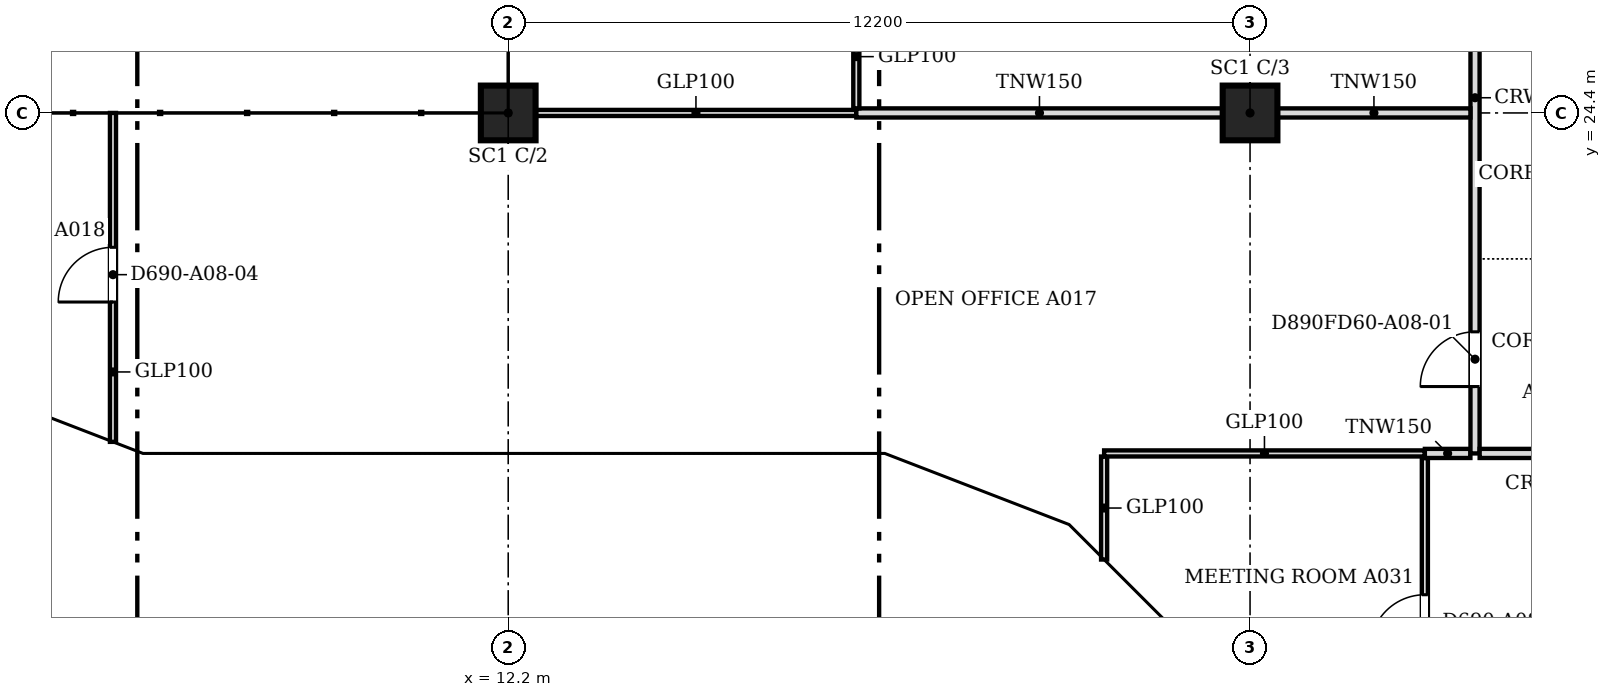
"""IFC4 building model, lengths in metres.
Left out: names, types, materials, properties, quantities, classifications, styles, units other than length and angle.
Written with IfcOpenShell. Run it as: python <this file> out.ifc"""

import sys

from ifc_helpers import new_model, si_unit, direction, frame, frame_2d, origin, origin_2d, place, context, subcontext, project, spatial, polyline, rectangle, outline, extrude, faceted_brep, source, transform, mapped, element, fill, save


model = new_model("IFC4")
c1 = context("Model", 3, precision=1e-05, world=origin(), true_north=direction((0.0, 1.0)))
c2 = subcontext(c1, "Body", "Model", "MODEL_VIEW")
j1 = project(units=[si_unit("LENGTHUNIT", "METRE"), si_unit("PLANEANGLEUNIT", "RADIAN")], contexts=[c1])
p1 = place(None, origin())
s1 = spatial("IfcSite", under=j1, at=p1, CompositionType="ELEMENT")
p2 = place(p1, origin())
s2 = spatial("IfcBuilding", under=s1, at=p2, CompositionType="ELEMENT")
p3 = place(p2, frame((0.0, 0.0, 95.2)))
s3 = spatial("IfcBuildingStorey", under=s2, at=p3, CompositionType="ELEMENT", Elevation=95.2)
for number, where, z_axis, x_axis in (
    (1, (12.2, 24.4, 0.0), (0.0, 0.0, 1.0), (1.0, 0.0, 0.0)),
    (2, (24.4, 24.4, 0.0), (0.0, 0.0, 1.0), (1.0, 0.0, 0.0)),
):
    element("IfcColumn", number, at=place(p3, frame(where, z_axis=z_axis, x_axis=x_axis)), inside=s3, PredefinedType="COLUMN", context=c2, shape_type="SweptSolid", body=[
        extrude(rectangle(XDim=0.9, YDim=0.9, at=origin_2d()), origin(), (0.0, 0.0, 1.0), 3.6),
    ])
m1 = source(origin(), c2, "Body", "Brep", [
    faceted_brep([(0.053, -0.25, 0.0), (3.003, -0.25, 3.8), (0.053, -0.25, 7.6), (0.0, -0.25, 7.532), (0.0, -0.25, 0.068), (0.106, 0.25, 7.532), (2.957, 0.25, 3.86), (2.957, 0.25, 3.74), (0.106, 0.25, 0.068), (3.003, 0.0, 3.8), (0.053, 0.0, 0.0), (0.053, 0.0, 7.6)], [[[0, 1, 2, 3, 4]], [[5, 6, 7, 8]], [[8, 7, 9, 1, 0, 10]], [[6, 5, 11, 2, 1, 9]], [[3, 2, 11]], [[10, 0, 4]], [[8, 10, 4, 3, 11, 5]], [[9, 7, 6]]]),
])
p4 = place(p3, frame((3.344, 19.631, -3.8), z_axis=(0.0, 0.0, 1.0), x_axis=(0.933007896601, -0.359855894603, 0.0)))
e3 = element("IfcWall", 3, at=p4, inside=s3, PredefinedType="SOLIDWALL", context=c2, shape_type="MappedRepresentation", body=[
    mapped(m1, transform((0.0, 0.0, 0.0), scale=1.0)),
])
m2 = source(origin(), c2, "Body", "SweptSolid", [
    extrude(outline(polyline([(0.253, 0.665), (2.687, 3.8), (0.253, 6.935), (0.253, 0.665)])), frame((0.0, 0.26, 0.0), z_axis=(0.0, -1.0, 0.0), x_axis=(1.0, 0.0, 0.0)), (0.0, 0.0, 1.0), 0.52),
])
p5 = place(p4, origin())
e4 = element("IfcOpeningElement", 4, at=p5, cuts=e3, PredefinedType="OPENING", context=c2, shape_type="MappedRepresentation", body=[
    mapped(m2, transform((0.0, 0.0, 0.0), scale=1.0)),
])
m3 = source(origin(), c2, "Body", "Brep", [
    faceted_brep([(3.003, -0.25, 0.0), (6.053, -0.25, 3.8), (3.003, -0.25, 7.6), (0.0, -0.25, 3.8), (0.047, 0.25, 3.859), (3.003, 0.25, 7.6), (6.053, 0.25, 3.8), (3.003, 0.25, 0.0), (0.047, 0.25, 3.741), (0.0, 0.0, 3.8)], [[[0, 1, 2, 3]], [[4, 5, 6, 7, 8]], [[7, 6, 1, 0]], [[6, 5, 2, 1]], [[5, 4, 9, 3, 2]], [[8, 7, 0, 3, 9]], [[8, 9, 4]]]),
])
p6 = place(p3, frame((6.146, 18.55, -3.8), z_axis=(0.0, 0.0, 1.0), x_axis=(1.0, 0.0, 0.0)))
e5 = element("IfcWall", 5, at=p6, inside=s3, PredefinedType="SOLIDWALL", context=c2, shape_type="MappedRepresentation", body=[
    mapped(m3, transform((0.0, 0.0, 0.0), scale=1.0)),
])
m4 = source(origin(), c2, "Body", "SweptSolid", [
    extrude(outline(polyline([(3.005, 0.401), (5.733, 3.8), (3.005, 7.199), (0.319, 3.8), (3.005, 0.401)])), frame((0.0, 0.26, 0.0), z_axis=(0.0, -1.0, 0.0), x_axis=(1.0, 0.0, 0.0)), (0.0, 0.0, 1.0), 0.52),
])
p7 = place(p6, origin())
e6 = element("IfcOpeningElement", 6, at=p7, cuts=e5, PredefinedType="OPENING", context=c2, shape_type="MappedRepresentation", body=[
    mapped(m4, transform((0.0, 0.0, 0.0), scale=1.0)),
])
m5 = source(origin(), c2, "Body", "Brep", [
    faceted_brep([(3.05, -0.25, 0.0), (6.1, -0.25, 3.743), (6.1, -0.25, 3.857), (3.05, -0.25, 7.6), (0.0, -0.25, 3.8), (0.0, 0.25, 3.8), (3.05, 0.25, 7.6), (6.146, 0.25, 3.8), (3.05, 0.25, 0.0), (6.146, -0.0, 3.8)], [[[0, 1, 2, 3, 4]], [[5, 6, 7, 8]], [[8, 7, 9, 1, 0]], [[7, 6, 3, 2, 9]], [[6, 5, 4, 3]], [[5, 8, 0, 4]], [[1, 9, 2]]]),
])
p8 = place(p3, frame((12.2, 18.55, -3.8), z_axis=(0.0, 0.0, 1.0), x_axis=(1.0, 0.0, 0.0)))
e7 = element("IfcWall", 7, at=p8, inside=s3, PredefinedType="SOLIDWALL", context=c2, shape_type="MappedRepresentation", body=[
    mapped(m5, transform((0.0, 0.0, 0.0), scale=1.0)),
])
m6 = source(origin(), c2, "Body", "SweptSolid", [
    extrude(outline(polyline([(3.052, 0.398), (5.824, 3.8), (3.052, 7.203), (0.321, 3.8), (3.052, 0.398)])), frame((0.0, 0.26, 0.0), z_axis=(0.0, -1.0, 0.0), x_axis=(1.0, 0.0, 0.0)), (0.0, 0.0, 1.0), 0.52),
])
p9 = place(p8, origin())
e8 = element("IfcOpeningElement", 8, at=p9, cuts=e7, PredefinedType="OPENING", context=c2, shape_type="MappedRepresentation", body=[
    mapped(m6, transform((0.0, 0.0, 0.0), scale=1.0)),
])
m7 = source(origin(), c2, "Body", "Brep", [
    faceted_brep([(3.096, -0.25, 7.536), (0.047, -0.25, 3.856), (0.047, -0.25, 3.744), (3.096, -0.25, 0.064), (0.0, 0.25, 3.8), (3.149, 0.25, 7.6), (3.202, 0.25, 7.536), (3.202, 0.25, 0.064), (3.149, 0.25, 0.0), (3.149, -0.0, 0.0), (3.149, -0.0, 7.6), (0.0, 0.0, 3.8)], [[[0, 1, 2, 3]], [[4, 5, 6, 7, 8]], [[8, 7, 9]], [[6, 5, 10]], [[5, 4, 11, 1, 0, 10]], [[4, 8, 9, 3, 2, 11]], [[11, 2, 1]], [[3, 9, 7, 6, 10, 0]]]),
])
p10 = place(p3, frame((18.346, 18.55, -3.8), z_axis=(0.0, 0.0, 1.0), x_axis=(0.932985567668, -0.359913782069, 0.0)))
e9 = element("IfcWall", 9, at=p10, inside=s3, PredefinedType="SOLIDWALL", context=c2, shape_type="MappedRepresentation", body=[
    mapped(m7, transform((0.0, 0.0, 0.0), scale=1.0)),
])
m8 = source(origin(), c2, "Body", "SweptSolid", [
    extrude(outline(polyline([(2.949, 6.967), (0.325, 3.8), (2.949, 0.633), (2.949, 6.967)])), frame((0.0, 0.26, 0.0), z_axis=(0.0, -1.0, 0.0), x_axis=(1.0, 0.0, 0.0)), (0.0, 0.0, 1.0), 0.52),
])
p11 = place(p10, origin())
e10 = element("IfcOpeningElement", 10, at=p11, cuts=e9, PredefinedType="OPENING", context=c2, shape_type="MappedRepresentation", body=[
    mapped(m8, transform((0.0, 0.0, 0.0), scale=1.0)),
])
m9 = source(origin(), c2, "Body", "Brep", [
    faceted_brep([(0.106, -0.25, 0.064), (3.156, -0.25, 3.736), (3.156, -0.25, 3.864), (0.106, -0.25, 7.536), (0.0, 0.25, 7.536), (0.053, 0.25, 7.6), (3.209, 0.25, 3.8), (0.053, 0.25, 0.0), (0.0, 0.25, 0.064), (3.209, -0.0, 3.8), (0.053, 0.0, 0.0), (0.053, 0.0, 7.6)], [[[0, 1, 2, 3]], [[4, 5, 6, 7, 8]], [[7, 6, 9, 1, 0, 10]], [[6, 5, 11, 3, 2, 9]], [[5, 4, 11]], [[8, 7, 10]], [[8, 10, 0, 3, 11, 4]], [[1, 9, 2]]]),
])
p12 = place(p3, frame((21.248, 17.454, -3.8), z_axis=(0.0, 0.0, 1.0), x_axis=(0.707106781187, -0.707106781187, 0.0)))
e11 = element("IfcWall", 11, at=p12, inside=s3, PredefinedType="SOLIDWALL", context=c2, shape_type="MappedRepresentation", body=[
    mapped(m9, transform((0.0, 0.0, 0.0), scale=1.0)),
])
m10 = source(origin(), c2, "Body", "SweptSolid", [
    extrude(outline(polyline([(0.253, 0.632), (2.884, 3.8), (0.253, 6.968), (0.253, 0.632)])), frame((0.0, 0.26, 0.0), z_axis=(0.0, -1.0, 0.0), x_axis=(1.0, 0.0, 0.0)), (0.0, 0.0, 1.0), 0.52),
])
p13 = place(p12, origin())
e12 = element("IfcOpeningElement", 12, at=p13, cuts=e11, PredefinedType="OPENING", context=c2, shape_type="MappedRepresentation", body=[
    mapped(m10, transform((0.0, 0.0, 0.0), scale=1.0)),
])
p14 = place(p2, frame((0.0, 0.0, 99.0)))
s4 = spatial("IfcBuildingStorey", under=s2, at=p14, CompositionType="ELEMENT", Elevation=99.0)
m11 = source(origin(), c2, "Body", "Brep", [
    faceted_brep([(2.95, -0.25, 0.0), (2.997, -0.25, 0.059), (2.997, -0.25, 7.541), (2.95, -0.25, 7.6), (0.0, -0.25, 3.8), (0.053, 0.25, 3.868), (2.904, 0.25, 7.54), (2.904, 0.25, 0.06), (0.053, 0.25, 3.732), (2.95, 0.0, 0.0), (2.95, 0.0, 7.6), (0.0, 0.0, 3.8)], [[[0, 1, 2, 3, 4]], [[5, 6, 7, 8]], [[1, 0, 9]], [[10, 3, 2]], [[6, 5, 11, 4, 3, 10]], [[8, 7, 9, 0, 4, 11]], [[8, 11, 5]], [[1, 9, 7, 6, 10, 2]]]),
])
p15 = place(p14, frame((3.394, 19.612, -3.8), z_axis=(0.0, 0.0, 1.0), x_axis=(0.932990326376, -0.359901446078, 0.0)))
e13 = element("IfcWall", 13, at=p15, inside=s4, PredefinedType="SOLIDWALL", context=c2, shape_type="MappedRepresentation", body=[
    mapped(m11, transform((0.0, 0.0, 0.0), scale=1.0)),
])
m12 = source(origin(), c2, "Body", "SweptSolid", [
    extrude(outline(polyline([(2.75, 6.935), (0.316, 3.8), (2.75, 0.665), (2.75, 6.935)])), frame((0.0, 0.26, 0.0), z_axis=(0.0, -1.0, 0.0), x_axis=(1.0, 0.0, 0.0)), (0.0, 0.0, 1.0), 0.52),
])
p16 = place(p15, origin())
e14 = element("IfcOpeningElement", 14, at=p16, cuts=e13, PredefinedType="OPENING", context=c2, shape_type="MappedRepresentation", body=[
    mapped(m12, transform((0.0, 0.0, 0.0), scale=1.0)),
])
m13 = source(origin(), c2, "Body", "Brep", [
    faceted_brep([(0.047, -0.25, 0.0), (3.05, -0.25, 3.8), (0.047, -0.25, 7.6), (0.0, -0.25, 7.54), (0.0, -0.25, 0.06), (0.093, 0.25, 7.541), (3.05, 0.25, 3.8), (0.093, 0.25, 0.059), (0.047, 0.0, 0.0), (0.047, 0.0, 7.6)], [[[0, 1, 2, 3, 4]], [[5, 6, 7]], [[7, 6, 1, 0, 8]], [[6, 5, 9, 2, 1]], [[3, 2, 9]], [[8, 0, 4]], [[7, 8, 4, 3, 9, 5]]]),
])
p17 = place(p14, frame((6.1, 18.55, -3.8), z_axis=(0.0, 0.0, 1.0), x_axis=(1.0, 0.0, 0.0)))
e15 = element("IfcWall", 15, at=p17, inside=s4, PredefinedType="SOLIDWALL", context=c2, shape_type="MappedRepresentation", body=[
    mapped(m13, transform((0.0, 0.0, 0.0), scale=1.0)),
])
m14 = source(origin(), c2, "Body", "SweptSolid", [
    extrude(outline(polyline([(0.247, 0.656), (2.731, 3.8), (0.247, 6.944), (0.247, 0.656)])), frame((0.0, 0.26, 0.0), z_axis=(0.0, -1.0, 0.0), x_axis=(1.0, 0.0, 0.0)), (0.0, 0.0, 1.0), 0.52),
])
p18 = place(p17, origin())
e16 = element("IfcOpeningElement", 16, at=p18, cuts=e15, PredefinedType="OPENING", context=c2, shape_type="MappedRepresentation", body=[
    mapped(m14, transform((0.0, 0.0, 0.0), scale=1.0)),
])
m15 = source(origin(), c2, "Body", "SweptSolid", [
    extrude(outline(polyline([(3.05, 0.0), (6.1, 3.8), (3.05, 7.6), (0.0, 3.8), (3.05, 0.0)])), frame((0.0, 0.25, 0.0), z_axis=(0.0, -1.0, 0.0), x_axis=(1.0, 0.0, 0.0)), (0.0, 0.0, 1.0), 0.5),
])
p19 = place(p14, frame((9.15, 18.55, -3.8), z_axis=(0.0, 0.0, 1.0), x_axis=(1.0, 0.0, 0.0)))
e17 = element("IfcWall", 17, at=p19, inside=s4, PredefinedType="SOLIDWALL", context=c2, shape_type="MappedRepresentation", body=[
    mapped(m15, transform((0.0, 0.0, 0.0), scale=1.0)),
])
m16 = source(origin(), c2, "Body", "SweptSolid", [
    extrude(outline(polyline([(3.05, 0.399), (5.78, 3.8), (3.05, 7.201), (0.321, 3.8), (3.05, 0.399)])), frame((0.0, 0.26, 0.0), z_axis=(0.0, -1.0, 0.0), x_axis=(1.0, 0.0, 0.0)), (0.0, 0.0, 1.0), 0.52),
])
p20 = place(p19, origin())
e18 = element("IfcOpeningElement", 18, at=p20, cuts=e17, PredefinedType="OPENING", context=c2, shape_type="MappedRepresentation", body=[
    mapped(m16, transform((0.0, 0.0, 0.0), scale=1.0)),
])
m17 = source(origin(), c2, "Body", "Brep", [
    faceted_brep([(3.05, -0.25, 7.543), (0.0, -0.25, 3.8), (3.05, -0.25, 0.057), (0.0, 0.25, 3.8), (3.096, 0.25, 7.6), (3.143, 0.25, 7.544), (3.143, 0.25, 0.056), (3.096, 0.25, 0.0), (3.096, -0.0, 0.0), (3.096, -0.0, 7.6)], [[[0, 1, 2]], [[3, 4, 5, 6, 7]], [[7, 6, 8]], [[5, 4, 9]], [[4, 3, 1, 0, 9]], [[3, 7, 8, 2, 1]], [[2, 8, 6, 5, 9, 0]]]),
])
p21 = place(p14, frame((15.25, 18.55, -3.8), z_axis=(0.0, 0.0, 1.0), x_axis=(1.0, 0.0, 0.0)))
e19 = element("IfcWall", 19, at=p21, inside=s4, PredefinedType="SOLIDWALL", context=c2, shape_type="MappedRepresentation", body=[
    mapped(m17, transform((0.0, 0.0, 0.0), scale=1.0)),
])
m18 = source(origin(), c2, "Body", "SweptSolid", [
    extrude(outline(polyline([(2.896, 6.959), (0.323, 3.8), (2.896, 0.641), (2.896, 6.959)])), frame((0.0, 0.26, 0.0), z_axis=(0.0, -1.0, 0.0), x_axis=(1.0, 0.0, 0.0)), (0.0, 0.0, 1.0), 0.52),
])
p22 = place(p21, origin())
e20 = element("IfcOpeningElement", 20, at=p22, cuts=e19, PredefinedType="OPENING", context=c2, shape_type="MappedRepresentation", body=[
    mapped(m18, transform((0.0, 0.0, 0.0), scale=1.0)),
])
m19 = source(origin(), c2, "Body", "Brep", [
    faceted_brep([(0.093, -0.25, 0.056), (3.143, -0.25, 3.736), (3.143, -0.25, 3.864), (0.093, -0.25, 7.544), (0.0, 0.25, 7.543), (0.047, 0.25, 7.6), (3.196, 0.25, 3.8), (0.047, 0.25, 0.0), (0.0, 0.25, 0.057), (3.196, -0.0, 3.8), (0.047, 0.0, 0.0), (0.047, 0.0, 7.6)], [[[0, 1, 2, 3]], [[4, 5, 6, 7, 8]], [[7, 6, 9, 1, 0, 10]], [[6, 5, 11, 3, 2, 9]], [[5, 4, 11]], [[8, 7, 10]], [[8, 10, 0, 3, 11, 4]], [[1, 9, 2]]]),
])
p23 = place(p14, frame((18.303, 18.567, -3.8), z_axis=(0.0, 0.0, 1.0), x_axis=(0.932978940178, -0.359930961693, 0.0)))
e21 = element("IfcWall", 21, at=p23, inside=s4, PredefinedType="SOLIDWALL", context=c2, shape_type="MappedRepresentation", body=[
    mapped(m19, transform((0.0, 0.0, 0.0), scale=1.0)),
])
m20 = source(origin(), c2, "Body", "SweptSolid", [
    extrude(outline(polyline([(0.247, 0.633), (2.871, 3.8), (0.247, 6.967), (0.247, 0.633)])), frame((0.0, 0.26, 0.0), z_axis=(0.0, -1.0, 0.0), x_axis=(1.0, 0.0, 0.0)), (0.0, 0.0, 1.0), 0.52),
])
p24 = place(p23, origin())
e22 = element("IfcOpeningElement", 22, at=p24, cuts=e21, PredefinedType="OPENING", context=c2, shape_type="MappedRepresentation", body=[
    mapped(m20, transform((0.0, 0.0, 0.0), scale=1.0)),
])
m21 = source(origin(), c2, "Body", "Brep", [
    faceted_brep([(3.103, -0.25, 7.536), (0.053, -0.25, 3.864), (0.053, -0.25, 3.736), (3.103, -0.25, 0.064), (0.0, 0.25, 3.8), (3.156, 0.25, 7.6), (3.209, 0.25, 7.536), (3.209, 0.25, 0.064), (3.156, 0.25, 0.0), (3.156, -0.0, 0.0), (3.156, -0.0, 7.6), (0.0, 0.0, 3.8)], [[[0, 1, 2, 3]], [[4, 5, 6, 7, 8]], [[8, 7, 9]], [[6, 5, 10]], [[5, 4, 11, 1, 0, 10]], [[4, 8, 9, 3, 2, 11]], [[11, 2, 1]], [[3, 9, 7, 6, 10, 0]]]),
])
p25 = place(p14, frame((21.285, 17.417, -3.8), z_axis=(0.0, 0.0, 1.0), x_axis=(0.707106781187, -0.707106781187, 0.0)))
e23 = element("IfcWall", 23, at=p25, inside=s4, PredefinedType="SOLIDWALL", context=c2, shape_type="MappedRepresentation", body=[
    mapped(m21, transform((0.0, 0.0, 0.0), scale=1.0)),
])
m22 = source(origin(), c2, "Body", "SweptSolid", [
    extrude(outline(polyline([(2.956, 6.968), (0.325, 3.8), (2.956, 0.632), (2.956, 6.968)])), frame((0.0, 0.26, 0.0), z_axis=(0.0, -1.0, 0.0), x_axis=(1.0, 0.0, 0.0)), (0.0, 0.0, 1.0), 0.52),
])
p26 = place(p25, origin())
e24 = element("IfcOpeningElement", 24, at=p26, cuts=e23, PredefinedType="OPENING", context=c2, shape_type="MappedRepresentation", body=[
    mapped(m22, transform((0.0, 0.0, 0.0), scale=1.0)),
])
p27 = place(p3, frame((27.275, 13.276, 0.0), z_axis=(0.0, 0.0, 1.0), x_axis=(0.0, 1.0, 0.0)))
e25 = element("IfcWall", 25, at=p27, inside=s3, PredefinedType="PARTITIONING", context=c2, shape_type="SweptSolid", body=[
    extrude(rectangle(XDim=5.448, YDim=0.1, at=frame_2d((2.724, 0.0))), origin(), (0.0, 0.0, 1.0), 3.067),
])
m23 = source(origin(), c2, "Body", "SweptSolid", [
    extrude(rectangle(XDim=0.9, YDim=2.1, at=frame_2d((0.45, 1.05))), frame((0.0, 0.06, 0.0), z_axis=(0.0, -1.0, 0.0), x_axis=(1.0, 0.0, 0.0)), (0.0, 0.0, 1.0), 0.12),
])
p28 = place(p27, frame((2.3, 0.0, 0.0)))
e26 = element("IfcOpeningElement", 26, at=p28, cuts=e25, PredefinedType="OPENING", context=c2, shape_type="MappedRepresentation", body=[
    mapped(m23, transform((0.0, 0.0, 0.0), scale=1.0)),
])
p29 = place(p3, frame((22.0, 17.055, 0.0), z_axis=(0.0, 0.0, 1.0), x_axis=(0.0, 1.0, 0.0)))
e27 = element("IfcWall", 27, at=p29, inside=s3, PredefinedType="PARTITIONING", context=c2, shape_type="SweptSolid", body=[
    extrude(rectangle(XDim=1.694, YDim=0.1, at=frame_2d((0.847, 0.0))), origin(), (0.0, 0.0, 1.0), 3.067),
])
p30 = place(p3, frame((22.0, 18.8, 0.0), z_axis=(0.0, 0.0, 1.0), x_axis=(1.0, 0.0, 0.0)))
e28 = element("IfcWall", 28, at=p30, inside=s3, PredefinedType="PARTITIONING", context=c2, shape_type="SweptSolid", body=[
    extrude(rectangle(XDim=5.274, YDim=0.1, at=frame_2d((2.637, 0.0))), origin(), (0.0, 0.0, 1.0), 3.067),
])
p31 = place(p3, frame((27.275, 18.8, 0.0), z_axis=(0.0, 0.0, 1.0), x_axis=(1.0, 0.0, 0.0)))
e29 = element("IfcWall", 29, at=p31, inside=s3, PredefinedType="PARTITIONING", context=c2, shape_type="SweptSolid", body=[
    extrude(rectangle(XDim=0.749, YDim=0.15, at=frame_2d((0.375, 0.0))), origin(), (0.0, 0.0, 1.0), 3.067),
])
p32 = place(p3, frame((28.1, 18.8, 0.0), z_axis=(0.0, 0.0, 1.0), x_axis=(0.0, 1.0, 0.0)))
e30 = element("IfcWall", 30, at=p32, inside=s3, PredefinedType="PARTITIONING", context=c2, shape_type="SweptSolid", body=[
    extrude(rectangle(XDim=26.424, YDim=0.15, at=frame_2d((13.212, 0.0))), origin(), (0.0, 0.0, 1.0), 3.067),
])
m24 = source(origin(), c2, "Body", "SweptSolid", [
    extrude(rectangle(XDim=0.9, YDim=2.1, at=frame_2d((0.45, 1.05))), frame((0.0, 0.085, 0.0), z_axis=(0.0, -1.0, 0.0), x_axis=(1.0, 0.0, 0.0)), (0.0, 0.0, 1.0), 0.17),
])
p33 = place(p32, frame((1.1, 0.0, 0.0)))
e31 = element("IfcOpeningElement", 31, at=p33, cuts=e30, PredefinedType="OPENING", context=c2, shape_type="MappedRepresentation", body=[
    mapped(m24, transform((0.0, 0.0, 0.0), scale=1.0)),
])
p34 = place(p32, frame((23.151, 0.0, 0.0)))
e32 = element("IfcOpeningElement", 32, at=p34, cuts=e30, PredefinedType="OPENING", context=c2, shape_type="MappedRepresentation", body=[
    mapped(m24, transform((0.0, 0.0, 0.0), scale=1.0)),
])
m25 = source(origin(), c2, "Body", "SweptSolid", [
    extrude(rectangle(XDim=1.0, YDim=2.1, at=frame_2d((0.5, 1.05))), frame((0.0, 0.085, 0.0), z_axis=(0.0, -1.0, 0.0), x_axis=(1.0, 0.0, 0.0)), (0.0, 0.0, 1.0), 0.17),
])
p35 = place(p32, frame((17.251, 0.0, 0.0)))
e33 = element("IfcOpeningElement", 33, at=p35, cuts=e30, PredefinedType="OPENING", context=c2, shape_type="MappedRepresentation", body=[
    mapped(m25, transform((0.0, 0.0, 0.0), scale=1.0)),
])
p36 = place(p32, frame((9.7, 0.0, 0.0)))
e34 = element("IfcOpeningElement", 34, at=p36, cuts=e30, PredefinedType="OPENING", context=c2, shape_type="MappedRepresentation", body=[
    mapped(m24, transform((0.0, 0.0, 0.0), scale=1.0)),
])
p37 = place(p3, frame((28.176, 18.8, 0.0), z_axis=(0.0, 0.0, 1.0), x_axis=(1.0, 0.0, 0.0)))
e35 = element("IfcWall", 35, at=p37, inside=s3, PredefinedType="PARTITIONING", context=c2, shape_type="SweptSolid", body=[
    extrude(rectangle(XDim=2.248, YDim=0.15, at=frame_2d((1.124, 0.0))), origin(), (0.0, 0.0, 1.0), 3.067),
])
p38 = place(p3, frame((5.7, 18.99, 0.0), z_axis=(0.0, 0.0, 1.0), x_axis=(0.0, 1.0, 0.0)))
e36 = element("IfcWall", 36, at=p38, inside=s3, PredefinedType="PARTITIONING", context=c2, shape_type="SweptSolid", body=[
    extrude(rectangle(XDim=5.41, YDim=0.1, at=frame_2d((2.705, 0.0))), origin(), (0.0, 0.0, 1.0), 3.067),
])
p39 = place(p38, frame((2.3, 0.0, 0.0)))
e37 = element("IfcOpeningElement", 37, at=p39, cuts=e36, PredefinedType="OPENING", context=c2, shape_type="MappedRepresentation", body=[
    mapped(m23, transform((0.0, 0.0, 0.0), scale=1.0)),
])
p40 = place(p3, frame((12.651, 24.4, 0.0), z_axis=(0.0, 0.0, 1.0), x_axis=(1.0, 0.0, 0.0)))
e38 = element("IfcWall", 38, at=p40, inside=s3, PredefinedType="PARTITIONING", context=c2, shape_type="SweptSolid", body=[
    extrude(rectangle(XDim=5.273, YDim=0.1, at=frame_2d((2.637, 0.0))), origin(), (0.0, 0.0, 1.0), 3.067),
])
p41 = place(p3, frame((17.925, 24.4, 0.0), z_axis=(0.0, 0.0, 1.0), x_axis=(1.0, 0.0, 0.0)))
e39 = element("IfcWall", 39, at=p41, inside=s3, PredefinedType="PARTITIONING", context=c2, shape_type="SweptSolid", body=[
    extrude(rectangle(XDim=6.024, YDim=0.15, at=frame_2d((3.012, 0.0))), origin(), (0.0, 0.0, 1.0), 3.067),
])
p42 = place(p3, frame((24.851, 24.4, 0.0), z_axis=(0.0, 0.0, 1.0), x_axis=(1.0, 0.0, 0.0)))
e40 = element("IfcWall", 40, at=p42, inside=s3, PredefinedType="PARTITIONING", context=c2, shape_type="SweptSolid", body=[
    extrude(rectangle(XDim=3.173, YDim=0.15, at=frame_2d((1.586, 0.0))), origin(), (0.0, 0.0, 1.0), 3.067),
])
p43 = place(p3, frame((17.925, 24.476, 0.0), z_axis=(0.0, 0.0, 1.0), x_axis=(0.0, 1.0, 0.0)))
e41 = element("IfcWall", 41, at=p43, inside=s3, PredefinedType="PARTITIONING", context=c2, shape_type="SweptSolid", body=[
    extrude(rectangle(XDim=4.293, YDim=0.1, at=frame_2d((2.146, 0.0))), origin(), (0.0, 0.0, 1.0), 3.067),
])
p44 = place(p43, frame((1.7, 0.0, 0.0)))
e42 = element("IfcOpeningElement", 42, at=p44, cuts=e41, PredefinedType="OPENING", context=c2, shape_type="MappedRepresentation", body=[
    mapped(m23, transform((0.0, 0.0, 0.0), scale=1.0)),
])
m26 = source(origin(), c2, "Body", "SweptSolid", [
    extrude(rectangle(XDim=0.9, YDim=2.1, at=frame_2d((0.45, 1.05))), frame((0.0, 0.025, 0.0), z_axis=(0.0, -1.0, 0.0), x_axis=(1.0, 0.0, 0.0)), (0.0, 0.0, 1.0), 0.05),
])
p45 = place(p33, origin())
e43 = element("IfcDoor", 43, at=p45, inside=s3, OperationType="SINGLE_SWING_LEFT", PredefinedType="DOOR", context=c2, shape_type="MappedRepresentation", body=[
    mapped(m26, transform((0.0, 0.0, 0.0), scale=1.0)),
])
fill(e31, e43)
p46 = place(p39, origin())
e44 = element("IfcDoor", 44, at=p46, inside=s3, OperationType="SINGLE_SWING_LEFT", PredefinedType="DOOR", context=c2, shape_type="MappedRepresentation", body=[
    mapped(m26, transform((0.0, 0.0, 0.0), scale=1.0)),
])
fill(e37, e44)
p47 = place(p28, origin())
e45 = element("IfcDoor", 45, at=p47, inside=s3, OperationType="SINGLE_SWING_LEFT", PredefinedType="DOOR", context=c2, shape_type="MappedRepresentation", body=[
    mapped(m26, transform((0.0, 0.0, 0.0), scale=1.0)),
])
fill(e26, e45)
save(model, sys.argv[1])
